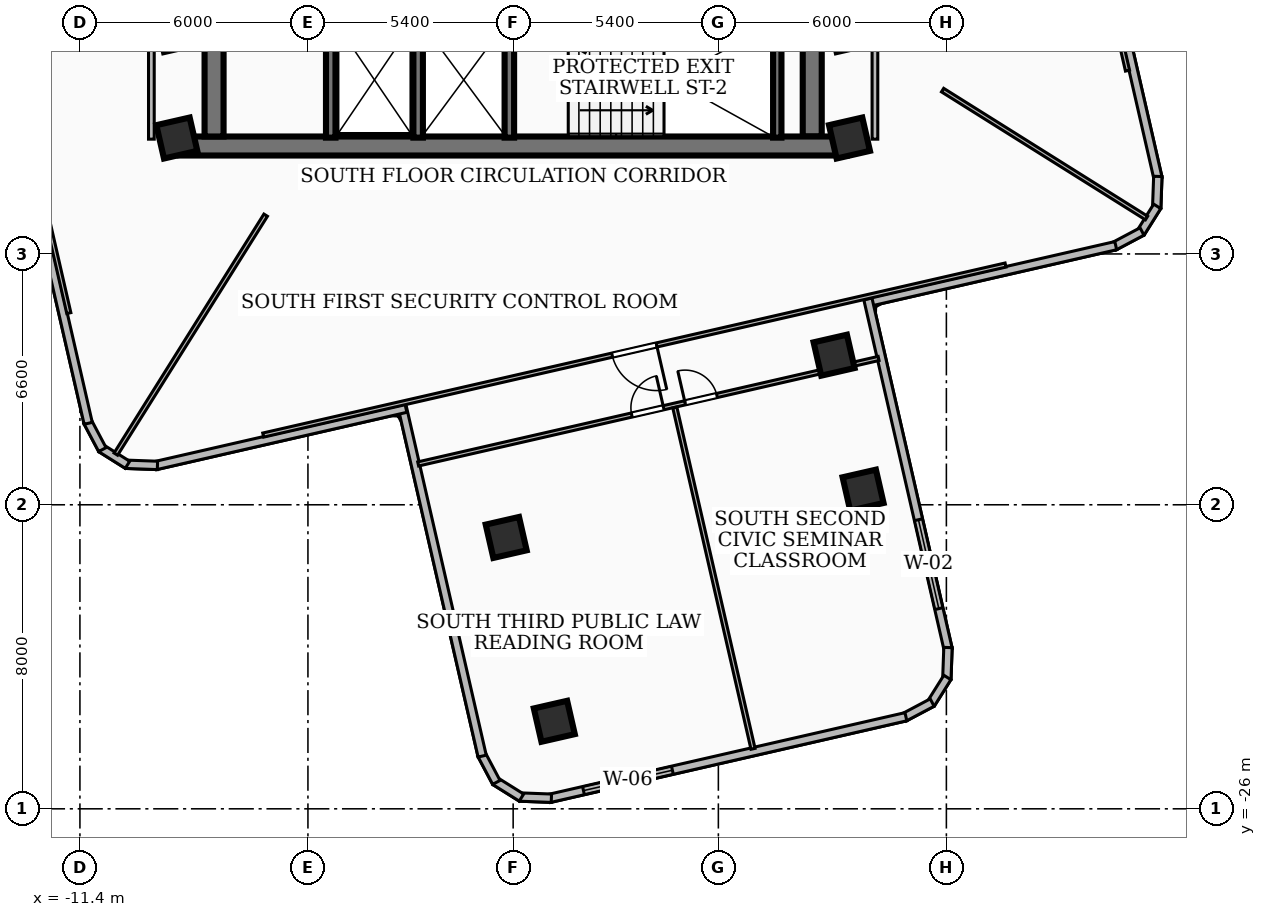
"""IFC4 building model, lengths in metres.
Left out: names, types, materials, properties, quantities, classifications, styles, units other than length and angle.
Written with IfcOpenShell. Run it as: python <this file> out.ifc"""

import sys

from ifc_helpers import new_model, si_unit, direction, frame, frame_2d, origin, origin_2d, place, context, subcontext, project, spatial, rectangle, extrude, element, fill, save


model = new_model("IFC4")
c1 = context("Model", 3, precision=1e-05, world=origin(), true_north=direction((0.0, 1.0)))
c2 = subcontext(c1, "Body", "Model", "MODEL_VIEW")
j1 = project(units=[si_unit("LENGTHUNIT", "METRE"), si_unit("PLANEANGLEUNIT", "RADIAN")], contexts=[c1])
p1 = place(None, origin())
s1 = spatial("IfcSite", under=j1, at=p1, CompositionType="ELEMENT")
p2 = place(p1, origin())
s2 = spatial("IfcBuilding", under=s1, at=p2, CompositionType="ELEMENT")
p3 = place(p2, frame((0.0, 0.0, 116.28)))
s3 = spatial("IfcBuildingStorey", under=s2, at=p3, CompositionType="ELEMENT", Elevation=116.28)
p4 = place(p3, frame((8.78, -8.56, 0.0), z_axis=(0.0, 0.0, 1.0), x_axis=(-1.0, 0.0, 0.0)))
e1 = element("IfcWall", 1, at=p4, inside=s3, PredefinedType="SHEAR", context=c2, shape_type="SweptSolid", body=[
    extrude(rectangle(XDim=17.56, YDim=0.5, at=frame_2d((8.78, 0.0))), origin(), (0.0, 0.0, 1.0), 3.34),
])
for number, where, z_axis, x_axis in (
    (2, (-7.87, -8.31, 0.0), (0.0, 0.0, 1.0), (0.0, 1.0, 0.0)),
    (3, (7.87, -2.0, 0.0), (0.0, 0.0, 1.0), (0.0, -1.0, 0.0)),
):
    element("IfcWall", number, at=place(p3, frame(where, z_axis=z_axis, x_axis=x_axis)), inside=s3, PredefinedType="SHEAR", context=c2, shape_type="SweptSolid", body=[
        extrude(rectangle(XDim=6.31, YDim=0.5, at=frame_2d((3.155, 0.0))), origin(), (0.0, 0.0, 1.0), 3.34),
    ])
p5 = place(p3, frame((6.95, -8.34, 0.0), z_axis=(0.0, 0.0, 1.0), x_axis=(0.0, 1.0, 0.0)))
e4 = element("IfcWall", 4, at=p5, inside=s3, PredefinedType="SOLIDWALL", context=c2, shape_type="SweptSolid", body=[
    extrude(rectangle(XDim=3.06, YDim=0.22, at=frame_2d((1.53, 0.0))), origin(), (0.0, 0.0, 1.0), 3.34),
])
for number, where, z_axis, x_axis in (
    (5, (-0.1, -8.34, 0.0), (0.0, 0.0, 1.0), (0.0, 1.0, 0.0)),
    (6, (-2.5, -8.34, 0.0), (0.0, 0.0, 1.0), (0.0, 1.0, 0.0)),
    (7, (-4.8, -8.34, 0.0), (0.0, 0.0, 1.0), (0.0, 1.0, 0.0)),
):
    element("IfcWall", number, at=place(p3, frame(where, z_axis=z_axis, x_axis=x_axis)), inside=s3, PredefinedType="SOLIDWALL", context=c2, shape_type="SweptSolid", body=[
        extrude(rectangle(XDim=3.04, YDim=0.25, at=frame_2d((1.52, 0.0))), origin(), (0.0, 0.0, 1.0), 3.34),
    ])
for number, where, z_axis, x_axis in (
    (8, (8.85, -8.35, 0.0), (0.0, 0.0, 1.0), (0.975, 0.223, 0.0)),
    (9, (-8.85, -8.35, 0.0), (0.0, 0.0, 1.0), (0.975, 0.223, 0.0)),
    (10, (-0.183, -18.86, 0.0), (0.0, 0.0, 1.0), (0.975, 0.223, 0.0)),
    (11, (8.445, -14.064, 0.0), (0.0, 0.0, 1.0), (0.975, 0.223, 0.0)),
    (12, (1.083, -23.697, 0.0), (0.0, 0.0, 1.0), (0.975, 0.223, 0.0)),
    (13, (9.208, -17.615, 0.0), (0.0, 0.0, 1.0), (0.975, 0.223, 0.0)),
):
    element("IfcColumn", number, at=place(p3, frame(where, z_axis=z_axis, x_axis=x_axis)), inside=s3, PredefinedType="COLUMN", context=c2, shape_type="SweptSolid", body=[
        extrude(rectangle(XDim=0.9, YDim=0.9, at=origin_2d()), origin(), (0.0, 0.0, 1.0), 3.6),
    ])
p6 = place(p3, frame((15.46, -2.821, 0.0), z_axis=(0.0, 0.0, 1.0), x_axis=(0.223278912438, -0.974754598481, 0.0)))
e14 = element("IfcWall", 14, at=p6, inside=s3, PredefinedType="SOLIDWALL", context=c2, shape_type="SweptSolid", body=[
    extrude(rectangle(XDim=6.759, YDim=0.22, at=frame_2d((3.379, 0.0))), origin(), (0.0, 0.0, 1.0), 3.34),
])
p7 = place(p3, frame((16.964, -9.36, 0.0), z_axis=(0.0, 0.0, 1.0), x_axis=(-0.035983706773, -0.999352376715, 0.0)))
e15 = element("IfcWall", 15, at=p7, inside=s3, PredefinedType="SOLIDWALL", context=c2, shape_type="SweptSolid", body=[
    extrude(rectangle(XDim=0.834, YDim=0.22, at=frame_2d((0.417, 0.0))), origin(), (0.0, 0.0, 1.0), 3.34),
])
p8 = place(p3, frame((16.948, -10.148, 0.0), z_axis=(0.0, 0.0, 1.0), x_axis=(-0.531096868492, -0.847311109497, 0.0)))
e16 = element("IfcWall", 16, at=p8, inside=s3, PredefinedType="SOLIDWALL", context=c2, shape_type="SweptSolid", body=[
    extrude(rectangle(XDim=0.819, YDim=0.22, at=frame_2d((0.41, 0.0))), origin(), (0.0, 0.0, 1.0), 3.34),
])
p9 = place(p3, frame((16.548, -10.809, 0.0), z_axis=(0.0, 0.0, 1.0), x_axis=(-0.883460266876, -0.468506090516, 0.0)))
e17 = element("IfcWall", 17, at=p9, inside=s3, PredefinedType="SOLIDWALL", context=c2, shape_type="SweptSolid", body=[
    extrude(rectangle(XDim=0.834, YDim=0.22, at=frame_2d((0.417, 0.0))), origin(), (0.0, 0.0, 1.0), 3.34),
])
p10 = place(p3, frame((15.857, -11.182, 0.0), z_axis=(0.0, 0.0, 1.0), x_axis=(-0.974754598481, -0.223278912438, 0.0)))
e18 = element("IfcWall", 18, at=p10, inside=s3, PredefinedType="SOLIDWALL", context=c2, shape_type="SweptSolid", body=[
    extrude(rectangle(XDim=6.759, YDim=0.22, at=frame_2d((3.379, 0.0))), origin(), (0.0, 0.0, 1.0), 3.34),
])
p11 = place(p3, frame((9.335, -12.585, 0.0), z_axis=(0.0, 0.0, 1.0), x_axis=(0.223290835532, -0.974751867281, 0.0)))
e19 = element("IfcWall", 19, at=p11, inside=s3, PredefinedType="SOLIDWALL", context=c2, shape_type="SweptSolid", body=[
    extrude(rectangle(XDim=9.459, YDim=0.22, at=frame_2d((4.729, 0.0))), origin(), (0.0, 0.0, 1.0), 3.34),
])
p12 = place(p11, frame((5.959, 0.0, 0.85)))
e20 = element("IfcOpeningElement", 20, at=p12, cuts=e19, PredefinedType="OPENING", context=c2, shape_type="SweptSolid", body=[
    extrude(rectangle(XDim=2.4, YDim=2.1, at=frame_2d((1.2, 1.05))), frame((0.0, 0.12, 0.0), z_axis=(0.0, -1.0, 0.0), x_axis=(1.0, 0.0, 0.0)), (0.0, 0.0, 1.0), 0.24),
])
p13 = place(p3, frame((11.442, -21.756, 0.0), z_axis=(0.0, 0.0, 1.0), x_axis=(-0.035691530512, -0.999362854348, 0.0)))
e21 = element("IfcWall", 21, at=p13, inside=s3, PredefinedType="SOLIDWALL", context=c2, shape_type="SweptSolid", body=[
    extrude(rectangle(XDim=0.834, YDim=0.22, at=frame_2d((0.417, 0.0))), origin(), (0.0, 0.0, 1.0), 3.34),
])
p14 = place(p3, frame((11.426, -22.544, 0.0), z_axis=(0.0, 0.0, 1.0), x_axis=(-0.53163377074, -0.846974340702, 0.0)))
e22 = element("IfcWall", 22, at=p14, inside=s3, PredefinedType="SOLIDWALL", context=c2, shape_type="SweptSolid", body=[
    extrude(rectangle(XDim=0.818, YDim=0.22, at=frame_2d((0.409, 0.0))), origin(), (0.0, 0.0, 1.0), 3.34),
])
p15 = place(p3, frame((11.026, -23.204, 0.0), z_axis=(0.0, 0.0, 1.0), x_axis=(-0.883396009524, -0.468627240307, 0.0)))
e23 = element("IfcWall", 23, at=p15, inside=s3, PredefinedType="SOLIDWALL", context=c2, shape_type="SweptSolid", body=[
    extrude(rectangle(XDim=0.834, YDim=0.22, at=frame_2d((0.417, 0.0))), origin(), (0.0, 0.0, 1.0), 3.34),
])
p16 = place(p3, frame((10.335, -23.577, 0.0), z_axis=(0.0, 0.0, 1.0), x_axis=(-0.974730937235, -0.223382183705, 0.0)))
e24 = element("IfcWall", 24, at=p16, inside=s3, PredefinedType="SOLIDWALL", context=c2, shape_type="SweptSolid", body=[
    extrude(rectangle(XDim=9.621, YDim=0.22, at=frame_2d((4.811, 0.0))), origin(), (0.0, 0.0, 1.0), 3.34),
])
p17 = place(p16, frame((6.304, 0.0, 0.85)))
e25 = element("IfcOpeningElement", 25, at=p17, cuts=e24, PredefinedType="OPENING", context=c2, shape_type="SweptSolid", body=[
    extrude(rectangle(XDim=2.4, YDim=1.85, at=frame_2d((1.2, 0.925))), frame((0.0, 0.12, 0.0), z_axis=(0.0, -1.0, 0.0), x_axis=(1.0, 0.0, 0.0)), (0.0, 0.0, 1.0), 0.24),
])
p18 = place(p3, frame((1.006, -25.721, 0.0), z_axis=(0.0, 0.0, 1.0), x_axis=(-0.999307996296, 0.037195813461, 0.0)))
e26 = element("IfcWall", 26, at=p18, inside=s3, PredefinedType="SOLIDWALL", context=c2, shape_type="SweptSolid", body=[
    extrude(rectangle(XDim=0.833, YDim=0.22, at=frame_2d((0.417, 0.0))), origin(), (0.0, 0.0, 1.0), 3.34),
])
p19 = place(p3, frame((0.219, -25.704, 0.0), z_axis=(0.0, 0.0, 1.0), x_axis=(-0.847847482865, 0.530240177466, 0.0)))
e27 = element("IfcWall", 27, at=p19, inside=s3, PredefinedType="SOLIDWALL", context=c2, shape_type="SweptSolid", body=[
    extrude(rectangle(XDim=0.819, YDim=0.22, at=frame_2d((0.409, 0.0))), origin(), (0.0, 0.0, 1.0), 3.34),
])
p20 = place(p3, frame((-0.442, -25.305, 0.0), z_axis=(0.0, 0.0, 1.0), x_axis=(-0.468250279951, 0.883595877835, 0.0)))
e28 = element("IfcWall", 28, at=p20, inside=s3, PredefinedType="SOLIDWALL", context=c2, shape_type="SweptSolid", body=[
    extrude(rectangle(XDim=0.835, YDim=0.22, at=frame_2d((0.417, 0.0))), origin(), (0.0, 0.0, 1.0), 3.34),
])
p21 = place(p3, frame((-0.815, -24.613, 0.0), z_axis=(0.0, 0.0, 1.0), x_axis=(-0.223313309104, 0.974746718885, 0.0)))
e29 = element("IfcWall", 29, at=p21, inside=s3, PredefinedType="SOLIDWALL", context=c2, shape_type="SweptSolid", body=[
    extrude(rectangle(XDim=9.458, YDim=0.22, at=frame_2d((4.729, 0.0))), origin(), (0.0, 0.0, 1.0), 2.57),
])
p22 = place(p3, frame((-2.821, -15.46, 0.0), z_axis=(0.0, 0.0, 1.0), x_axis=(-0.974754598481, -0.223278912438, 0.0)))
e30 = element("IfcWall", 30, at=p22, inside=s3, PredefinedType="SOLIDWALL", context=c2, shape_type="SweptSolid", body=[
    extrude(rectangle(XDim=6.759, YDim=0.22, at=frame_2d((3.379, 0.0))), origin(), (0.0, 0.0, 1.0), 2.57),
])
p23 = place(p3, frame((-9.36, -16.964, 0.0), z_axis=(0.0, 0.0, 1.0), x_axis=(-0.999352376715, 0.035983706773, 0.0)))
e31 = element("IfcWall", 31, at=p23, inside=s3, PredefinedType="SOLIDWALL", context=c2, shape_type="SweptSolid", body=[
    extrude(rectangle(XDim=0.834, YDim=0.22, at=frame_2d((0.417, 0.0))), origin(), (0.0, 0.0, 1.0), 3.34),
])
p24 = place(p3, frame((-10.148, -16.948, 0.0), z_axis=(0.0, 0.0, 1.0), x_axis=(-0.847311109497, 0.531096868492, 0.0)))
e32 = element("IfcWall", 32, at=p24, inside=s3, PredefinedType="SOLIDWALL", context=c2, shape_type="SweptSolid", body=[
    extrude(rectangle(XDim=0.819, YDim=0.22, at=frame_2d((0.41, 0.0))), origin(), (0.0, 0.0, 1.0), 3.34),
])
p25 = place(p3, frame((-10.809, -16.548, 0.0), z_axis=(0.0, 0.0, 1.0), x_axis=(-0.468506090516, 0.883460266876, 0.0)))
e33 = element("IfcWall", 33, at=p25, inside=s3, PredefinedType="SOLIDWALL", context=c2, shape_type="SweptSolid", body=[
    extrude(rectangle(XDim=0.834, YDim=0.22, at=frame_2d((0.417, 0.0))), origin(), (0.0, 0.0, 1.0), 3.34),
])
p26 = place(p3, frame((-11.182, -15.857, 0.0), z_axis=(0.0, 0.0, 1.0), x_axis=(-0.223278912438, 0.974754598481, 0.0)))
e34 = element("IfcWall", 34, at=p26, inside=s3, PredefinedType="SOLIDWALL", context=c2, shape_type="SweptSolid", body=[
    extrude(rectangle(XDim=6.759, YDim=0.22, at=frame_2d((3.379, 0.0))), origin(), (0.0, 0.0, 1.0), 3.34),
])
for number, where, z_axis, x_axis in (
    (35, (-9.52, -8.38, 0.0), (0.0, 0.0, 1.0), (0.0, 1.0, 0.0)),
    (36, (9.52, -8.38, 0.0), (0.0, 0.0, 1.0), (0.0, 1.0, 0.0)),
):
    element("IfcWall", number, at=place(p3, frame(where, z_axis=z_axis, x_axis=x_axis)), inside=s3, PredefinedType="PARTITIONING", context=c2, shape_type="SweptSolid", body=[
        extrude(rectangle(XDim=6.63, YDim=0.15, at=frame_2d((3.315, 0.0))), origin(), (0.0, 0.0, 1.0), 2.57),
    ])
p27 = place(p3, frame((-6.512, -10.38, 0.0), z_axis=(0.0, 0.0, 1.0), x_axis=(-0.531323053356, -0.847169294163, 0.0)))
e37 = element("IfcWall", 37, at=p27, inside=s3, PredefinedType="PARTITIONING", context=c2, shape_type="SweptSolid", body=[
    extrude(rectangle(XDim=7.421, YDim=0.11, at=frame_2d((3.711, 0.0))), origin(), (0.0, 0.0, 1.0), 2.57),
])
p28 = place(p3, frame((11.3, -7.089, 0.0), z_axis=(0.0, 0.0, 1.0), x_axis=(0.847172398776, -0.531318103167, 0.0)))
e38 = element("IfcWall", 38, at=p28, inside=s3, PredefinedType="PARTITIONING", context=c2, shape_type="SweptSolid", body=[
    extrude(rectangle(XDim=6.335, YDim=0.11, at=frame_2d((3.167, 0.0))), origin(), (0.0, 0.0, 1.0), 3.34),
])
p29 = place(p3, frame((11.692, 12.957, 0.0), z_axis=(0.0, 0.0, 1.0), x_axis=(0.223262093598, -0.97475845088, 0.0)))
e39 = element("IfcWall", 39, at=p29, inside=s3, PredefinedType="PARTITIONING", context=c2, shape_type="SweptSolid", body=[
    extrude(rectangle(XDim=20.04, YDim=0.11, at=frame_2d((10.02, 0.0))), origin(), (0.0, 0.0, 1.0), 2.57),
])
p30 = place(p29, frame((9.42, 0.0, 0.0)))
e40 = element("IfcOpeningElement", 40, at=p30, cuts=e39, PredefinedType="OPENING", context=c2, shape_type="SweptSolid", body=[
    extrude(rectangle(XDim=1.2, YDim=2.1, at=frame_2d((0.6, 1.05))), frame((0.0, 0.065, 0.0), z_axis=(0.0, -1.0, 0.0), x_axis=(1.0, 0.0, 0.0)), (0.0, 0.0, 1.0), 0.13),
])
p31 = place(p3, frame((-11.692, -12.957, 0.0), z_axis=(0.0, 0.0, 1.0), x_axis=(-0.223262093598, 0.97475845088, 0.0)))
e41 = element("IfcWall", 41, at=p31, inside=s3, PredefinedType="PARTITIONING", context=c2, shape_type="SweptSolid", body=[
    extrude(rectangle(XDim=20.04, YDim=0.11, at=frame_2d((10.02, 0.0))), origin(), (0.0, 0.0, 1.0), 2.57),
])
p32 = place(p31, frame((9.42, 0.0, 0.0)))
e42 = element("IfcOpeningElement", 42, at=p32, cuts=e41, PredefinedType="OPENING", context=c2, shape_type="SweptSolid", body=[
    extrude(rectangle(XDim=1.2, YDim=2.1, at=frame_2d((0.6, 1.05))), frame((0.0, 0.065, 0.0), z_axis=(0.0, -1.0, 0.0), x_axis=(1.0, 0.0, 0.0)), (0.0, 0.0, 1.0), 0.13),
])
p33 = place(p3, frame((12.957, -11.692, 0.0), z_axis=(0.0, 0.0, 1.0), x_axis=(-0.97475845088, -0.223262093598, 0.0)))
e43 = element("IfcWall", 43, at=p33, inside=s3, PredefinedType="PARTITIONING", context=c2, shape_type="SweptSolid", body=[
    extrude(rectangle(XDim=20.04, YDim=0.11, at=frame_2d((10.02, 0.0))), origin(), (0.0, 0.0, 1.0), 2.57),
])
p34 = place(p33, frame((9.42, 0.0, 0.0)))
e44 = element("IfcOpeningElement", 44, at=p34, cuts=e43, PredefinedType="OPENING", context=c2, shape_type="SweptSolid", body=[
    extrude(rectangle(XDim=1.2, YDim=2.1, at=frame_2d((0.6, 1.05))), frame((0.0, 0.065, 0.0), z_axis=(0.0, -1.0, 0.0), x_axis=(1.0, 0.0, 0.0)), (0.0, 0.0, 1.0), 0.13),
])
p35 = place(p3, frame((4.254, -15.44, 0.0), z_axis=(0.0, 0.0, 1.0), x_axis=(0.223344166789, -0.974739648912, 0.0)))
e45 = element("IfcWall", 45, at=p35, inside=s3, PredefinedType="PARTITIONING", context=c2, shape_type="SweptSolid", body=[
    extrude(rectangle(XDim=9.215, YDim=0.11, at=frame_2d((4.607, 0.0))), origin(), (0.0, 0.0, 1.0), 2.72),
])
p36 = place(p3, frame((-2.499, -16.926, 0.0), z_axis=(0.0, 0.0, 1.0), x_axis=(0.974740247341, 0.223341555051, 0.0)))
e46 = element("IfcWall", 46, at=p36, inside=s3, PredefinedType="PARTITIONING", context=c2, shape_type="SweptSolid", body=[
    extrude(rectangle(XDim=12.43, YDim=0.11, at=frame_2d((6.215, 0.0))), origin(), (0.0, 0.0, 1.0), 2.57),
])
p37 = place(p36, frame((5.765, 0.0, 0.0)))
e47 = element("IfcOpeningElement", 47, at=p37, cuts=e46, PredefinedType="OPENING", context=c2, shape_type="SweptSolid", body=[
    extrude(rectangle(XDim=0.86, YDim=2.04, at=frame_2d((0.43, 1.02))), frame((0.0, 0.065, 0.0), z_axis=(0.0, -1.0, 0.0), x_axis=(1.0, 0.0, 0.0)), (0.0, 0.0, 1.0), 0.13),
])
p38 = place(p36, frame((7.205, 0.0, 0.0)))
e48 = element("IfcOpeningElement", 48, at=p38, cuts=e46, PredefinedType="OPENING", context=c2, shape_type="SweptSolid", body=[
    extrude(rectangle(XDim=0.86, YDim=2.04, at=frame_2d((0.43, 1.02))), frame((0.0, 0.065, 0.0), z_axis=(0.0, -1.0, 0.0), x_axis=(1.0, 0.0, 0.0)), (0.0, 0.0, 1.0), 0.13),
])
p39 = place(p12, origin())
e49 = element("IfcWindow", 49, at=p39, inside=s3, PartitioningType="SINGLE_PANEL", PredefinedType="WINDOW", context=c2, shape_type="SweptSolid", body=[
    extrude(rectangle(XDim=2.4, YDim=2.1, at=frame_2d((1.2, 1.05))), frame((0.0, 0.03, 0.0), z_axis=(0.0, -1.0, 0.0), x_axis=(1.0, 0.0, 0.0)), (0.0, 0.0, 1.0), 0.06),
])
fill(e20, e49)
p40 = place(p17, origin())
e50 = element("IfcWindow", 50, at=p40, inside=s3, PartitioningType="SINGLE_PANEL", PredefinedType="WINDOW", context=c2, shape_type="SweptSolid", body=[
    extrude(rectangle(XDim=2.4, YDim=1.85, at=frame_2d((1.2, 0.925))), frame((0.0, 0.03, 0.0), z_axis=(0.0, -1.0, 0.0), x_axis=(1.0, 0.0, 0.0)), (0.0, 0.0, 1.0), 0.06),
])
fill(e25, e50)
p41 = place(p34, origin())
e51 = element("IfcDoor", 51, at=p41, inside=s3, OperationType="SINGLE_SWING_LEFT", PredefinedType="DOOR", context=c2, shape_type="SweptSolid", body=[
    extrude(rectangle(XDim=1.2, YDim=2.1, at=frame_2d((0.6, 1.05))), frame((0.0, 0.025, 0.0), z_axis=(0.0, -1.0, 0.0), x_axis=(1.0, 0.0, 0.0)), (0.0, 0.0, 1.0), 0.05),
])
fill(e44, e51)
p42 = place(p37, origin())
e52 = element("IfcDoor", 52, at=p42, inside=s3, OperationType="SINGLE_SWING_RIGHT", PredefinedType="DOOR", context=c2, shape_type="SweptSolid", body=[
    extrude(rectangle(XDim=0.86, YDim=2.04, at=frame_2d((0.43, 1.02))), frame((0.0, 0.025, 0.0), z_axis=(0.0, -1.0, 0.0), x_axis=(1.0, 0.0, 0.0)), (0.0, 0.0, 1.0), 0.05),
])
fill(e47, e52)
p43 = place(p38, origin())
e53 = element("IfcDoor", 53, at=p43, inside=s3, OperationType="SINGLE_SWING_LEFT", PredefinedType="DOOR", context=c2, shape_type="SweptSolid", body=[
    extrude(rectangle(XDim=0.86, YDim=2.04, at=frame_2d((0.43, 1.02))), frame((0.0, 0.025, 0.0), z_axis=(0.0, -1.0, 0.0), x_axis=(1.0, 0.0, 0.0)), (0.0, 0.0, 1.0), 0.05),
])
fill(e48, e53)
save(model, sys.argv[1])
